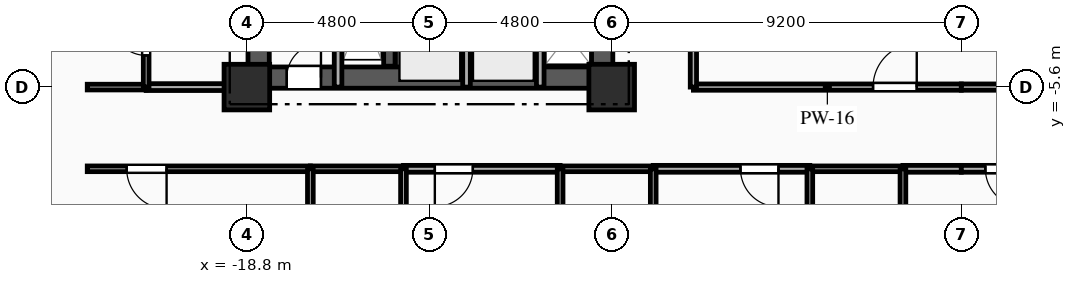
"""IFC4 building model, lengths in metres.
Left out: names, types, materials, properties, quantities, classifications, styles, units other than length and angle.
Written with IfcOpenShell. Run it as: python <this file> out.ifc"""

import sys

from ifc_helpers import new_model, si_unit, direction, frame, frame_2d, origin, origin_2d, place, context, subcontext, project, spatial, rectangle, extrude, element, fill, save


model = new_model("IFC4")
c1 = context("Model", 3, precision=1e-05, world=origin(), true_north=direction((0.0, 1.0)))
c2 = subcontext(c1, "Body", "Model", "MODEL_VIEW")
j1 = project(units=[si_unit("LENGTHUNIT", "METRE"), si_unit("PLANEANGLEUNIT", "RADIAN")], contexts=[c1])
p1 = place(None, origin())
s1 = spatial("IfcSite", under=j1, at=p1, CompositionType="ELEMENT")
p2 = place(p1, origin())
s2 = spatial("IfcBuilding", under=s1, at=p2, CompositionType="ELEMENT")
p3 = place(p2, frame((0.0, 0.0, 53.8)))
s3 = spatial("IfcBuildingStorey", under=s2, at=p3, CompositionType="ELEMENT", Elevation=53.8)
for number, where, z_axis, x_axis in (
    (1, (-18.8, -5.6, 0.0), (0.0, 0.0, 1.0), (1.0, 0.0, 0.0)),
    (2, (-9.2, -5.6, 0.0), (0.0, 0.0, 1.0), (1.0, 0.0, 0.0)),
):
    element("IfcColumn", number, at=place(p3, frame(where, z_axis=z_axis, x_axis=x_axis)), inside=s3, PredefinedType="COLUMN", context=c2, shape_type="SweptSolid", body=[
        extrude(rectangle(XDim=1.2, YDim=1.2, at=origin_2d()), origin(), (0.0, 0.0, 1.0), 3.35),
    ])
p4 = place(p3, frame((-18.8, -5.35, 0.0), z_axis=(0.0, 0.0, 1.0), x_axis=(1.0, 0.0, 0.0)))
e3 = element("IfcWall", 3, at=p4, inside=s3, PredefinedType="SHEAR", context=c2, shape_type="SweptSolid", body=[
    extrude(rectangle(XDim=9.6, YDim=0.56, at=frame_2d((4.8, 0.0))), origin(), (0.0, 0.0, 1.0), 3.035),
])
p5 = place(p4, frame((1.05, 0.0, 0.0)))
e4 = element("IfcOpeningElement", 4, at=p5, cuts=e3, PredefinedType="OPENING", context=c2, shape_type="SweptSolid", body=[
    extrude(rectangle(XDim=0.9, YDim=2.1, at=frame_2d((0.45, 1.05))), frame((0.0, 0.29, 0.0), z_axis=(0.0, -1.0, 0.0), x_axis=(1.0, 0.0, 0.0)), (0.0, 0.0, 1.0), 0.58),
])
p6 = place(p3, frame((-18.49, -5.05, 0.0), z_axis=(0.0, 0.0, 1.0), x_axis=(0.0, 1.0, 0.0)))
e5 = element("IfcWall", 5, at=p6, inside=s3, PredefinedType="SHEAR", context=c2, shape_type="SweptSolid", body=[
    extrude(rectangle(XDim=10.1, YDim=0.56, at=frame_2d((5.05, 0.0))), origin(), (0.0, 0.0, 1.0), 3.035),
])
p7 = place(p3, frame((-9.45, -5.05, 0.0), z_axis=(0.0, 0.0, 1.0), x_axis=(0.0, 1.0, 0.0)))
e6 = element("IfcWall", 6, at=p7, inside=s3, PredefinedType="SHEAR", context=c2, shape_type="SweptSolid", body=[
    extrude(rectangle(XDim=10.1, YDim=0.56, at=frame_2d((5.05, 0.0))), origin(), (0.0, 0.0, 1.0), 3.035),
])
p8 = place(p7, frame((7.15, 0.0, 0.0)))
e7 = element("IfcOpeningElement", 7, at=p8, cuts=e6, PredefinedType="OPENING", context=c2, shape_type="SweptSolid", body=[
    extrude(rectangle(XDim=0.9, YDim=2.1, at=frame_2d((0.45, 1.05))), frame((0.0, 0.29, 0.0), z_axis=(0.0, -1.0, 0.0), x_axis=(1.0, 0.0, 0.0)), (0.0, 0.0, 1.0), 0.58),
])
p9 = place(p7, frame((2.4, 0.0, 0.0)))
e8 = element("IfcOpeningElement", 8, at=p9, cuts=e6, PredefinedType="OPENING", context=c2, shape_type="SweptSolid", body=[
    extrude(rectangle(XDim=1.2, YDim=2.15, at=frame_2d((0.6, 1.075))), frame((0.0, 0.29, 0.0), z_axis=(0.0, -1.0, 0.0), x_axis=(1.0, 0.0, 0.0)), (0.0, 0.0, 1.0), 0.58),
])
p10 = place(p3, frame((-15.05, -5.05, 0.0), z_axis=(0.0, 0.0, 1.0), x_axis=(0.0, 1.0, 0.0)))
e9 = element("IfcWall", 9, at=p10, inside=s3, PredefinedType="SHEAR", context=c2, shape_type="SweptSolid", body=[
    extrude(rectangle(XDim=10.1, YDim=0.3, at=frame_2d((5.05, 0.0))), origin(), (0.0, 0.0, 1.0), 3.035),
])
p11 = place(p3, frame((-16.4, -5.6, 0.0), z_axis=(0.0, 0.0, 1.0), x_axis=(0.0, 1.0, 0.0)))
e10 = element("IfcWall", 10, at=p11, inside=s3, PredefinedType="PARTITIONING", context=c2, shape_type="SweptSolid", body=[
    extrude(rectangle(XDim=3.49, YDim=0.2, at=frame_2d((1.745, 0.0))), origin(), (0.0, 0.0, 1.0), 3.035),
])
for number, where, z_axis, x_axis in (
    (11, (-13.02, -5.6, 0.0), (0.0, 0.0, 1.0), (0.0, 1.0, 0.0)),
    (12, (-11.08, -5.6, 0.0), (0.0, 0.0, 1.0), (0.0, 1.0, 0.0)),
):
    element("IfcWall", number, at=place(p3, frame(where, z_axis=z_axis, x_axis=x_axis)), inside=s3, PredefinedType="PARTITIONING", context=c2, shape_type="SweptSolid", body=[
        extrude(rectangle(XDim=2.25, YDim=0.2, at=frame_2d((1.125, 0.0))), origin(), (0.0, 0.0, 1.0), 3.035),
    ])
p12 = place(p3, frame((-21.45, -5.6, 0.0), z_axis=(0.0, 0.0, 1.0), x_axis=(1.0, 0.0, 0.0)))
e13 = element("IfcWall", 13, at=p12, inside=s3, PredefinedType="PARTITIONING", context=c2, shape_type="SweptSolid", body=[
    extrude(rectangle(XDim=2.65, YDim=0.18, at=frame_2d((1.325, 0.0))), origin(), (0.0, 0.0, 1.0), 3.035),
])
p13 = place(p3, frame((-23.0, -5.6, 0.0), z_axis=(0.0, 0.0, 1.0), x_axis=(1.0, 0.0, 0.0)))
e14 = element("IfcWall", 14, at=p13, inside=s3, PredefinedType="PLUMBINGWALL", context=c2, shape_type="SweptSolid", body=[
    extrude(rectangle(XDim=1.55, YDim=0.15, at=frame_2d((0.775, 0.0))), origin(), (0.0, 0.0, 1.0), 3.035),
])
p14 = place(p3, frame((-17.129, -7.75, 0.0), z_axis=(0.0, 0.0, 1.0), x_axis=(-1.0, 0.0, 0.0)))
e15 = element("IfcWall", 15, at=p14, inside=s3, PredefinedType="PARTITIONING", context=c2, shape_type="SweptSolid", body=[
    extrude(rectangle(XDim=5.871, YDim=0.15, at=frame_2d((2.936, 0.0))), origin(), (0.0, 0.0, 1.0), 3.035),
])
p15 = place(p14, frame((3.783, 0.0, 0.0)))
e16 = element("IfcOpeningElement", 16, at=p15, cuts=e15, PredefinedType="OPENING", context=c2, shape_type="SweptSolid", body=[
    extrude(rectangle(XDim=1.05, YDim=2.15, at=frame_2d((0.525, 1.075))), frame((0.0, 0.085, 0.0), z_axis=(0.0, -1.0, 0.0), x_axis=(1.0, 0.0, 0.0)), (0.0, 0.0, 1.0), 0.17),
])
p16 = place(p3, frame((-10.557, -7.75, 0.0), z_axis=(0.0, 0.0, 1.0), x_axis=(-1.0, 0.0, 0.0)))
e17 = element("IfcWall", 17, at=p16, inside=s3, PredefinedType="PARTITIONING", context=c2, shape_type="SweptSolid", body=[
    extrude(rectangle(XDim=4.122, YDim=0.18, at=frame_2d((2.061, 0.0))), origin(), (0.0, 0.0, 1.0), 3.035),
])
p17 = place(p16, frame((2.297, 0.0, 0.0)))
e18 = element("IfcOpeningElement", 18, at=p17, cuts=e17, PredefinedType="OPENING", context=c2, shape_type="SweptSolid", body=[
    extrude(rectangle(XDim=1.0, YDim=2.15, at=frame_2d((0.5, 1.075))), frame((0.0, 0.1, 0.0), z_axis=(0.0, -1.0, 0.0), x_axis=(1.0, 0.0, 0.0)), (0.0, 0.0, 1.0), 0.2),
])
p18 = place(p3, frame((-14.679, -7.75, 0.0), z_axis=(0.0, 0.0, 1.0), x_axis=(-1.0, 0.0, 0.0)))
e19 = element("IfcWall", 19, at=p18, inside=s3, PredefinedType="PLUMBINGWALL", context=c2, shape_type="SweptSolid", body=[
    extrude(rectangle(XDim=2.45, YDim=0.15, at=frame_2d((1.225, 0.0))), origin(), (0.0, 0.0, 1.0), 3.035),
])
p19 = place(p3, frame((-3.986, -7.75, 0.0), z_axis=(0.0, 0.0, 1.0), x_axis=(-1.0, 0.0, 0.0)))
e20 = element("IfcWall", 20, at=p19, inside=s3, PredefinedType="PARTITIONING", context=c2, shape_type="SweptSolid", body=[
    extrude(rectangle(XDim=4.121, YDim=0.18, at=frame_2d((2.061, 0.0))), origin(), (0.0, 0.0, 1.0), 3.035),
])
p20 = place(p19, frame((0.825, 0.0, 0.0)))
e21 = element("IfcOpeningElement", 21, at=p20, cuts=e20, PredefinedType="OPENING", context=c2, shape_type="SweptSolid", body=[
    extrude(rectangle(XDim=1.0, YDim=2.15, at=frame_2d((0.5, 1.075))), frame((0.0, 0.1, 0.0), z_axis=(0.0, -1.0, 0.0), x_axis=(1.0, 0.0, 0.0)), (0.0, 0.0, 1.0), 0.2),
])
p21 = place(p3, frame((-8.107, -7.75, 0.0), z_axis=(0.0, 0.0, 1.0), x_axis=(-1.0, 0.0, 0.0)))
e22 = element("IfcWall", 22, at=p21, inside=s3, PredefinedType="PLUMBINGWALL", context=c2, shape_type="SweptSolid", body=[
    extrude(rectangle(XDim=2.45, YDim=0.15, at=frame_2d((1.225, 0.0))), origin(), (0.0, 0.0, 1.0), 3.035),
])
p22 = place(p3, frame((0.0, -7.75, 0.0), z_axis=(0.0, 0.0, 1.0), x_axis=(-1.0, 0.0, 0.0)))
e23 = element("IfcWall", 23, at=p22, inside=s3, PredefinedType="PARTITIONING", context=c2, shape_type="SweptSolid", body=[
    extrude(rectangle(XDim=1.536, YDim=0.18, at=frame_2d((0.768, 0.0))), origin(), (0.0, 0.0, 1.0), 3.035),
])
p23 = place(p3, frame((-1.536, -7.75, 0.0), z_axis=(0.0, 0.0, 1.0), x_axis=(-1.0, 0.0, 0.0)))
e24 = element("IfcWall", 24, at=p23, inside=s3, PredefinedType="PLUMBINGWALL", context=c2, shape_type="SweptSolid", body=[
    extrude(rectangle(XDim=2.45, YDim=0.15, at=frame_2d((1.225, 0.0))), origin(), (0.0, 0.0, 1.0), 3.035),
])
p24 = place(p3, frame((-7.05, -5.6, 0.0), z_axis=(0.0, 0.0, 1.0), x_axis=(1.0, 0.0, 0.0)))
e25 = element("IfcWall", 25, at=p24, inside=s3, PredefinedType="PARTITIONING", context=c2, shape_type="SweptSolid", body=[
    extrude(rectangle(XDim=7.05, YDim=0.165, at=frame_2d((3.525, 0.0))), origin(), (0.0, 0.0, 1.0), 2.52),
])
p25 = place(p24, frame((4.728, 0.0, 0.0)))
e26 = element("IfcOpeningElement", 26, at=p25, cuts=e25, PredefinedType="OPENING", context=c2, shape_type="SweptSolid", body=[
    extrude(rectangle(XDim=1.15, YDim=2.15, at=frame_2d((0.575, 1.075))), frame((0.0, 0.093, 0.0), z_axis=(0.0, -1.0, 0.0), x_axis=(1.0, 0.0, 0.0)), (0.0, 0.0, 1.0), 0.185),
])
p26 = place(p3, frame((2.586, -7.75, 0.0), z_axis=(0.0, 0.0, 1.0), x_axis=(-1.0, 0.0, 0.0)))
e27 = element("IfcWall", 27, at=p26, inside=s3, PredefinedType="PARTITIONING", context=c2, shape_type="SweptSolid", body=[
    extrude(rectangle(XDim=2.586, YDim=0.18, at=frame_2d((1.293, 0.0))), origin(), (0.0, 0.0, 1.0), 3.035),
])
p27 = place(p26, frame((0.953, 0.0, 0.0)))
e28 = element("IfcOpeningElement", 28, at=p27, cuts=e27, PredefinedType="OPENING", context=c2, shape_type="SweptSolid", body=[
    extrude(rectangle(XDim=1.0, YDim=2.15, at=frame_2d((0.5, 1.075))), frame((0.0, 0.1, 0.0), z_axis=(0.0, -1.0, 0.0), x_axis=(1.0, 0.0, 0.0)), (0.0, 0.0, 1.0), 0.2),
])
p28 = place(p3, frame((0.0, -5.6, 0.0), z_axis=(0.0, 0.0, 1.0), x_axis=(1.0, 0.0, 0.0)))
e29 = element("IfcWall", 29, at=p28, inside=s3, PredefinedType="PARTITIONING", context=c2, shape_type="SweptSolid", body=[
    extrude(rectangle(XDim=7.05, YDim=0.165, at=frame_2d((3.525, 0.0))), origin(), (0.0, 0.0, 1.0), 2.52),
])
p29 = place(p3, frame((-7.05, 1.45, 0.0), z_axis=(0.0, 0.0, 1.0), x_axis=(0.0, -1.0, 0.0)))
e30 = element("IfcWall", 30, at=p29, inside=s3, PredefinedType="PARTITIONING", context=c2, shape_type="SweptSolid", body=[
    extrude(rectangle(XDim=7.05, YDim=0.165, at=frame_2d((3.525, 0.0))), origin(), (0.0, 0.0, 1.0), 3.035),
])
p30 = place(p3, frame((-21.45, -5.6, 0.0), z_axis=(0.0, 0.0, 1.0), x_axis=(0.0, 1.0, 0.0)))
e31 = element("IfcWall", 31, at=p30, inside=s3, PredefinedType="PLUMBINGWALL", context=c2, shape_type="SweptSolid", body=[
    extrude(rectangle(XDim=2.35, YDim=0.15, at=frame_2d((1.175, 0.0))), origin(), (0.0, 0.0, 1.0), 3.035),
])
p31 = place(p30, frame((0.834, 0.0, 0.0)))
e32 = element("IfcOpeningElement", 32, at=p31, cuts=e31, PredefinedType="OPENING", context=c2, shape_type="SweptSolid", body=[
    extrude(rectangle(XDim=0.9, YDim=2.1, at=frame_2d((0.45, 1.05))), frame((0.0, 0.085, 0.0), z_axis=(0.0, -1.0, 0.0), x_axis=(1.0, 0.0, 0.0)), (0.0, 0.0, 1.0), 0.17),
])
for number, where, z_axis, x_axis in (
    (33, (-17.129, -7.75, 0.0), (0.0, 0.0, 1.0), (0.0, -1.0, 0.0)),
    (34, (-14.679, -9.9, 0.0), (0.0, 0.0, 1.0), (0.0, 1.0, 0.0)),
    (35, (-10.557, -7.75, 0.0), (0.0, 0.0, 1.0), (0.0, -1.0, 0.0)),
    (36, (-8.107, -9.9, 0.0), (0.0, 0.0, 1.0), (0.0, 1.0, 0.0)),
    (37, (-3.986, -7.75, 0.0), (0.0, 0.0, 1.0), (0.0, -1.0, 0.0)),
    (38, (-1.536, -9.9, 0.0), (0.0, 0.0, 1.0), (0.0, 1.0, 0.0)),
):
    element("IfcWall", number, at=place(p3, frame(where, z_axis=z_axis, x_axis=x_axis)), inside=s3, PredefinedType="PLUMBINGWALL", context=c2, shape_type="SweptSolid", body=[
        extrude(rectangle(XDim=2.15, YDim=0.15, at=frame_2d((1.075, 0.0))), origin(), (0.0, 0.0, 1.0), 3.035),
    ])
p32 = place(p5, origin())
e39 = element("IfcDoor", 39, at=p32, inside=s3, OperationType="SINGLE_SWING_RIGHT", PredefinedType="DOOR", context=c2, shape_type="SweptSolid", body=[
    extrude(rectangle(XDim=0.9, YDim=2.1, at=frame_2d((0.45, 1.05))), frame((0.0, 0.025, 0.0), z_axis=(0.0, -1.0, 0.0), x_axis=(1.0, 0.0, 0.0)), (0.0, 0.0, 1.0), 0.05),
])
fill(e4, e39)
p33 = place(p15, origin())
e40 = element("IfcDoor", 40, at=p33, inside=s3, OperationType="SINGLE_SWING_LEFT", PredefinedType="DOOR", context=c2, shape_type="SweptSolid", body=[
    extrude(rectangle(XDim=1.05, YDim=2.15, at=frame_2d((0.525, 1.075))), frame((0.0, 0.025, 0.0), z_axis=(0.0, -1.0, 0.0), x_axis=(1.0, 0.0, 0.0)), (0.0, 0.0, 1.0), 0.05),
])
fill(e16, e40)
p34 = place(p17, origin())
e41 = element("IfcDoor", 41, at=p34, inside=s3, OperationType="SINGLE_SWING_RIGHT", PredefinedType="DOOR", context=c2, shape_type="SweptSolid", body=[
    extrude(rectangle(XDim=1.0, YDim=2.15, at=frame_2d((0.5, 1.075))), frame((0.0, 0.025, 0.0), z_axis=(0.0, -1.0, 0.0), x_axis=(1.0, 0.0, 0.0)), (0.0, 0.0, 1.0), 0.05),
])
fill(e18, e41)
p35 = place(p20, origin())
e42 = element("IfcDoor", 42, at=p35, inside=s3, OperationType="SINGLE_SWING_LEFT", PredefinedType="DOOR", context=c2, shape_type="SweptSolid", body=[
    extrude(rectangle(XDim=1.0, YDim=2.15, at=frame_2d((0.5, 1.075))), frame((0.0, 0.025, 0.0), z_axis=(0.0, -1.0, 0.0), x_axis=(1.0, 0.0, 0.0)), (0.0, 0.0, 1.0), 0.05),
])
fill(e21, e42)
p36 = place(p25, origin())
e43 = element("IfcDoor", 43, at=p36, inside=s3, OperationType="SINGLE_SWING_RIGHT", PredefinedType="DOOR", context=c2, shape_type="SweptSolid", body=[
    extrude(rectangle(XDim=1.15, YDim=2.15, at=frame_2d((0.575, 1.075))), frame((0.0, 0.025, 0.0), z_axis=(0.0, -1.0, 0.0), x_axis=(1.0, 0.0, 0.0)), (0.0, 0.0, 1.0), 0.05),
])
fill(e26, e43)
p37 = place(p27, origin())
e44 = element("IfcDoor", 44, at=p37, inside=s3, OperationType="SINGLE_SWING_LEFT", PredefinedType="DOOR", context=c2, shape_type="SweptSolid", body=[
    extrude(rectangle(XDim=1.0, YDim=2.15, at=frame_2d((0.5, 1.075))), frame((0.0, 0.025, 0.0), z_axis=(0.0, -1.0, 0.0), x_axis=(1.0, 0.0, 0.0)), (0.0, 0.0, 1.0), 0.05),
])
fill(e28, e44)
p38 = place(p31, origin())
e45 = element("IfcDoor", 45, at=p38, inside=s3, OperationType="SINGLE_SWING_RIGHT", PredefinedType="DOOR", context=c2, shape_type="SweptSolid", body=[
    extrude(rectangle(XDim=0.9, YDim=2.1, at=frame_2d((0.45, 1.05))), frame((0.0, 0.025, 0.0), z_axis=(0.0, -1.0, 0.0), x_axis=(1.0, 0.0, 0.0)), (0.0, 0.0, 1.0), 0.05),
])
fill(e32, e45)
save(model, sys.argv[1])
